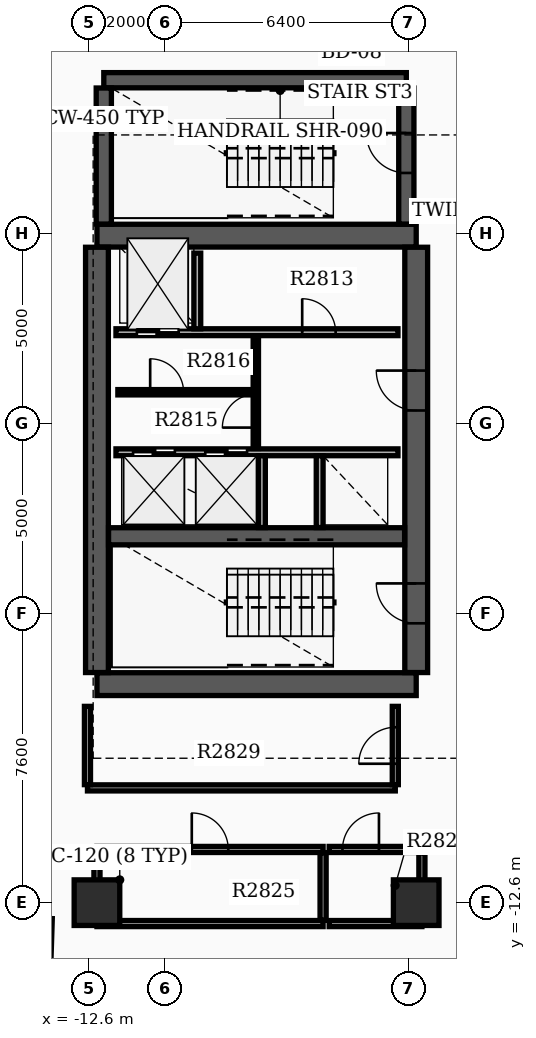
"""IFC4 building model, lengths in metres.
Left out: names, types, materials, properties, quantities, classifications, styles, units other than length and angle.
Written with IfcOpenShell. Run it as: python <this file> out.ifc"""

import sys

from ifc_helpers import new_model, si_unit, direction, frame, frame_2d, origin, origin_2d, place, context, subcontext, project, spatial, rectangle, extrude, element, fill, save


model = new_model("IFC4")
c1 = context("Model", 3, precision=1e-05, world=origin(), true_north=direction((0.0, 1.0)))
c2 = subcontext(c1, "Body", "Model", "MODEL_VIEW")
j1 = project(units=[si_unit("LENGTHUNIT", "METRE"), si_unit("PLANEANGLEUNIT", "RADIAN")], contexts=[c1])
p1 = place(None, origin())
s1 = spatial("IfcSite", under=j1, at=p1, CompositionType="ELEMENT")
p2 = place(p1, origin())
s2 = spatial("IfcBuilding", under=s1, at=p2, CompositionType="ELEMENT")
p3 = place(p2, frame((0.0, 0.0, 176.1)))
s3 = spatial("IfcBuildingStorey", under=s2, at=p3, CompositionType="ELEMENT", Elevation=176.1)
for number, where, z_axis, x_axis in (
    (1, (-12.4, -6.85, 0.0), (0.0, 0.0, 1.0), (1.0, 0.0, 0.0)),
    (2, (-12.4, 4.95, 0.0), (0.0, 0.0, 1.0), (1.0, 0.0, 0.0)),
):
    element("IfcWall", number, at=place(p3, frame(where, z_axis=z_axis, x_axis=x_axis)), inside=s3, PredefinedType="SHEAR", context=c2, shape_type="SweptSolid", body=[
        extrude(rectangle(XDim=8.4, YDim=0.6, at=frame_2d((4.2, 0.0))), origin(), (0.0, 0.0, 1.0), 3.7),
    ])
p4 = place(p3, frame((-12.4, -6.545, 0.0), z_axis=(0.0, 0.0, 1.0), x_axis=(0.0, 1.0, 0.0)))
e3 = element("IfcWall", 3, at=p4, inside=s3, PredefinedType="SHEAR", context=c2, shape_type="SweptSolid", body=[
    extrude(rectangle(XDim=11.19, YDim=0.6, at=frame_2d((5.595, 0.0))), origin(), (0.0, 0.0, 1.0), 3.7),
])
p5 = place(p3, frame((-4.0, -6.545, 0.0), z_axis=(0.0, 0.0, 1.0), x_axis=(0.0, 1.0, 0.0)))
e4 = element("IfcWall", 4, at=p5, inside=s3, PredefinedType="SHEAR", context=c2, shape_type="SweptSolid", body=[
    extrude(rectangle(XDim=11.19, YDim=0.6, at=frame_2d((5.595, 0.0))), origin(), (0.0, 0.0, 1.0), 3.7),
])
p6 = place(p5, frame((1.295, 0.0, 0.0)))
e5 = element("IfcOpeningElement", 5, at=p6, cuts=e4, PredefinedType="OPENING", context=c2, shape_type="SweptSolid", body=[
    extrude(rectangle(XDim=1.05, YDim=2.15, at=frame_2d((0.525, 1.075))), frame((0.0, 0.31, 0.0), z_axis=(0.0, -1.0, 0.0), x_axis=(1.0, 0.0, 0.0)), (0.0, 0.0, 1.0), 0.62),
])
p7 = place(p5, frame((6.895, 0.0, 0.0)))
e6 = element("IfcOpeningElement", 6, at=p7, cuts=e4, PredefinedType="OPENING", context=c2, shape_type="SweptSolid", body=[
    extrude(rectangle(XDim=1.05, YDim=2.15, at=frame_2d((0.525, 1.075))), frame((0.0, 0.31, 0.0), z_axis=(0.0, -1.0, 0.0), x_axis=(1.0, 0.0, 0.0)), (0.0, 0.0, 1.0), 0.62),
])
p8 = place(p3, frame((-12.095, -2.96, 0.0), z_axis=(0.0, 0.0, 1.0), x_axis=(1.0, 0.0, 0.0)))
e7 = element("IfcWall", 7, at=p8, inside=s3, PredefinedType="SHEAR", context=c2, shape_type="SweptSolid", body=[
    extrude(rectangle(XDim=7.79, YDim=0.45, at=frame_2d((3.895, 0.0))), origin(), (0.0, 0.0, 1.0), 3.7),
])
p9 = place(p3, frame((-12.22, 9.04, 0.0), z_axis=(0.0, 0.0, 1.0), x_axis=(1.0, 0.0, 0.0)))
e8 = element("IfcWall", 8, at=p9, inside=s3, PredefinedType="SHEAR", context=c2, shape_type="SweptSolid", body=[
    extrude(rectangle(XDim=7.96, YDim=0.4, at=frame_2d((3.98, 0.0))), origin(), (0.0, 0.0, 1.0), 3.7),
])
p10 = place(p3, frame((-12.22, 5.255, 0.0), z_axis=(0.0, 0.0, 1.0), x_axis=(0.0, 1.0, 0.0)))
e9 = element("IfcWall", 9, at=p10, inside=s3, PredefinedType="SHEAR", context=c2, shape_type="SweptSolid", body=[
    extrude(rectangle(XDim=3.58, YDim=0.4, at=frame_2d((1.79, 0.0))), origin(), (0.0, 0.0, 1.0), 3.7),
])
p11 = place(p3, frame((-4.26, 5.255, 0.0), z_axis=(0.0, 0.0, 1.0), x_axis=(0.0, 1.0, 0.0)))
e10 = element("IfcWall", 10, at=p11, inside=s3, PredefinedType="SHEAR", context=c2, shape_type="SweptSolid", body=[
    extrude(rectangle(XDim=3.58, YDim=0.4, at=frame_2d((1.79, 0.0))), origin(), (0.0, 0.0, 1.0), 3.7),
])
p12 = place(p11, frame((1.345, 0.0, 0.0)))
e11 = element("IfcOpeningElement", 11, at=p12, cuts=e10, PredefinedType="OPENING", context=c2, shape_type="SweptSolid", body=[
    extrude(rectangle(XDim=1.05, YDim=2.15, at=frame_2d((0.525, 1.075))), frame((0.0, 0.21, 0.0), z_axis=(0.0, -1.0, 0.0), x_axis=(1.0, 0.0, 0.0)), (0.0, 0.0, 1.0), 0.42),
])
for number, where, z_axis, x_axis in (
    (12, (-12.4, -12.6, 0.0), (0.0, 0.0, 1.0), (1.0, 0.0, 0.0)),
    (13, (-4.0, -12.6, 0.0), (0.0, 0.0, 1.0), (1.0, 0.0, 0.0)),
):
    element("IfcColumn", number, at=place(p3, frame(where, z_axis=z_axis, x_axis=x_axis)), inside=s3, PredefinedType="COLUMN", context=c2, shape_type="SweptSolid", body=[
        extrude(rectangle(XDim=1.2, YDim=1.2, at=origin_2d()), origin(), (0.0, 0.0, 1.0), 3.9),
    ])
p13 = place(p3, frame((-11.9, 2.41, 0.0), z_axis=(0.0, 0.0, 1.0), x_axis=(1.0, 0.0, 0.0)))
e14 = element("IfcWall", 14, at=p13, inside=s3, PredefinedType="SOLIDWALL", context=c2, shape_type="SweptSolid", body=[
    extrude(rectangle(XDim=7.42, YDim=0.18, at=frame_2d((3.71, 0.0))), origin(), (0.0, 0.0, 1.0), 2.96),
])
p14 = place(p13, frame((0.55, 0.0, 0.0)))
e15 = element("IfcOpeningElement", 15, at=p14, cuts=e14, PredefinedType="OPENING", context=c2, shape_type="SweptSolid", body=[
    extrude(rectangle(XDim=1.1, YDim=2.15, at=frame_2d((0.55, 1.075))), frame((0.0, 0.1, 0.0), z_axis=(0.0, -1.0, 0.0), x_axis=(1.0, 0.0, 0.0)), (0.0, 0.0, 1.0), 0.2),
])
p15 = place(p13, frame((4.9, 0.0, 0.0)))
e16 = element("IfcOpeningElement", 16, at=p15, cuts=e14, PredefinedType="OPENING", context=c2, shape_type="SweptSolid", body=[
    extrude(rectangle(XDim=0.88, YDim=2.1, at=frame_2d((0.44, 1.05))), frame((0.0, 0.1, 0.0), z_axis=(0.0, -1.0, 0.0), x_axis=(1.0, 0.0, 0.0)), (0.0, 0.0, 1.0), 0.2),
])
p16 = place(p3, frame((-11.9, -0.75, 0.0), z_axis=(0.0, 0.0, 1.0), x_axis=(1.0, 0.0, 0.0)))
e17 = element("IfcWall", 17, at=p16, inside=s3, PredefinedType="SOLIDWALL", context=c2, shape_type="SweptSolid", body=[
    extrude(rectangle(XDim=7.42, YDim=0.18, at=frame_2d((3.71, 0.0))), origin(), (0.0, 0.0, 1.0), 2.96),
])
p17 = place(p16, frame((0.45, 0.0, 0.0)))
e18 = element("IfcOpeningElement", 18, at=p17, cuts=e17, PredefinedType="OPENING", context=c2, shape_type="SweptSolid", body=[
    extrude(rectangle(XDim=1.1, YDim=2.15, at=frame_2d((0.55, 1.075))), frame((0.0, 0.1, 0.0), z_axis=(0.0, -1.0, 0.0), x_axis=(1.0, 0.0, 0.0)), (0.0, 0.0, 1.0), 0.2),
])
p18 = place(p16, frame((2.35, 0.0, 0.0)))
e19 = element("IfcOpeningElement", 19, at=p18, cuts=e17, PredefinedType="OPENING", context=c2, shape_type="SweptSolid", body=[
    extrude(rectangle(XDim=1.1, YDim=2.15, at=frame_2d((0.55, 1.075))), frame((0.0, 0.1, 0.0), z_axis=(0.0, -1.0, 0.0), x_axis=(1.0, 0.0, 0.0)), (0.0, 0.0, 1.0), 0.2),
])
p19 = place(p3, frame((-9.76, 2.5, 0.0), z_axis=(0.0, 0.0, 1.0), x_axis=(0.0, 1.0, 0.0)))
e20 = element("IfcWall", 20, at=p19, inside=s3, PredefinedType="SOLIDWALL", context=c2, shape_type="SweptSolid", body=[
    extrude(rectangle(XDim=1.99, YDim=0.18, at=frame_2d((0.995, 0.0))), origin(), (0.0, 0.0, 1.0), 2.96),
])
for number, where, z_axis, x_axis in (
    (21, (-8.06, -2.73, 0.0), (0.0, 0.0, 1.0), (0.0, 1.0, 0.0)),
    (22, (-6.54, -2.73, 0.0), (0.0, 0.0, 1.0), (0.0, 1.0, 0.0)),
):
    element("IfcWall", number, at=place(p3, frame(where, z_axis=z_axis, x_axis=x_axis)), inside=s3, PredefinedType="SOLIDWALL", context=c2, shape_type="SweptSolid", body=[
        extrude(rectangle(XDim=1.89, YDim=0.18, at=frame_2d((0.945, 0.0))), origin(), (0.0, 0.0, 1.0), 2.96),
    ])
p20 = place(p3, frame((-8.22, -0.65, 0.0), z_axis=(0.0, 0.0, 1.0), x_axis=(0.0, 1.0, 0.0)))
e23 = element("IfcWall", 23, at=p20, inside=s3, PredefinedType="SOLIDWALL", context=c2, shape_type="SweptSolid", body=[
    extrude(rectangle(XDim=2.96, YDim=0.14, at=frame_2d((1.48, 0.0))), origin(), (0.0, 0.0, 1.0), 2.96),
])
p21 = place(p20, frame((0.55, 0.0, 0.0)))
e24 = element("IfcOpeningElement", 24, at=p21, cuts=e23, PredefinedType="OPENING", context=c2, shape_type="SweptSolid", body=[
    extrude(rectangle(XDim=0.88, YDim=2.1, at=frame_2d((0.44, 1.05))), frame((0.0, 0.08, 0.0), z_axis=(0.0, -1.0, 0.0), x_axis=(1.0, 0.0, 0.0)), (0.0, 0.0, 1.0), 0.16),
])
p22 = place(p3, frame((-11.85, 0.83, 0.0), z_axis=(0.0, 0.0, 1.0), x_axis=(1.0, 0.0, 0.0)))
e25 = element("IfcWall", 25, at=p22, inside=s3, PredefinedType="PARTITIONING", context=c2, shape_type="SweptSolid", body=[
    extrude(rectangle(XDim=3.552, YDim=0.14, at=frame_2d((1.776, 0.0))), origin(), (0.0, 0.0, 1.0), 2.96),
])
p23 = place(p22, frame((0.85, 0.0, 0.0)))
e26 = element("IfcOpeningElement", 26, at=p23, cuts=e25, PredefinedType="OPENING", context=c2, shape_type="SweptSolid", body=[
    extrude(rectangle(XDim=0.88, YDim=2.1, at=frame_2d((0.44, 1.05))), frame((0.0, 0.08, 0.0), z_axis=(0.0, -1.0, 0.0), x_axis=(1.0, 0.0, 0.0)), (0.0, 0.0, 1.0), 0.16),
])
p24 = place(p3, frame((-12.4, -13.15, 0.0), z_axis=(0.0, 0.0, 1.0), x_axis=(1.0, 0.0, 0.0)))
e27 = element("IfcWall", 27, at=p24, inside=s3, PredefinedType="PARTITIONING", context=c2, shape_type="SweptSolid", body=[
    extrude(rectangle(XDim=5.95, YDim=0.16, at=frame_2d((2.975, 0.0))), origin(), (0.0, 0.0, 1.0), 2.96),
])
p25 = place(p3, frame((-12.4, -11.2, 0.0), z_axis=(0.0, 0.0, 1.0), x_axis=(1.0, 0.0, 0.0)))
e28 = element("IfcWall", 28, at=p25, inside=s3, PredefinedType="PARTITIONING", context=c2, shape_type="SweptSolid", body=[
    extrude(rectangle(XDim=5.95, YDim=0.16, at=frame_2d((2.975, 0.0))), origin(), (0.0, 0.0, 1.0), 2.96),
])
p26 = place(p25, frame((2.495, 0.0, 0.0)))
e29 = element("IfcOpeningElement", 29, at=p26, cuts=e28, PredefinedType="OPENING", context=c2, shape_type="SweptSolid", body=[
    extrude(rectangle(XDim=0.96, YDim=2.15, at=frame_2d((0.48, 1.075))), frame((0.0, 0.09, 0.0), z_axis=(0.0, -1.0, 0.0), x_axis=(1.0, 0.0, 0.0)), (0.0, 0.0, 1.0), 0.18),
])
for number, where, z_axis, x_axis in (
    (30, (-12.4, -13.065, 0.0), (0.0, 0.0, 1.0), (0.0, 1.0, 0.0)),
    (31, (-6.45, -13.065, 0.0), (0.0, 0.0, 1.0), (0.0, 1.0, 0.0)),
):
    element("IfcWall", number, at=place(p3, frame(where, z_axis=z_axis, x_axis=x_axis)), inside=s3, PredefinedType="PARTITIONING", context=c2, shape_type="SweptSolid", body=[
        extrude(rectangle(XDim=1.78, YDim=0.16, at=frame_2d((0.89, 0.0))), origin(), (0.0, 0.0, 1.0), 2.96),
    ])
p27 = place(p3, frame((-6.29, -13.15, 0.0), z_axis=(0.0, 0.0, 1.0), x_axis=(1.0, 0.0, 0.0)))
e32 = element("IfcWall", 32, at=p27, inside=s3, PredefinedType="PARTITIONING", context=c2, shape_type="SweptSolid", body=[
    extrude(rectangle(XDim=2.44, YDim=0.16, at=frame_2d((1.22, 0.0))), origin(), (0.0, 0.0, 1.0), 2.96),
])
p28 = place(p3, frame((-6.29, -11.2, 0.0), z_axis=(0.0, 0.0, 1.0), x_axis=(1.0, 0.0, 0.0)))
e33 = element("IfcWall", 33, at=p28, inside=s3, PredefinedType="PARTITIONING", context=c2, shape_type="SweptSolid", body=[
    extrude(rectangle(XDim=2.44, YDim=0.16, at=frame_2d((1.22, 0.0))), origin(), (0.0, 0.0, 1.0), 2.96),
])
p29 = place(p28, frame((0.35, 0.0, 0.0)))
e34 = element("IfcOpeningElement", 34, at=p29, cuts=e33, PredefinedType="OPENING", context=c2, shape_type="SweptSolid", body=[
    extrude(rectangle(XDim=0.96, YDim=2.15, at=frame_2d((0.48, 1.075))), frame((0.0, 0.09, 0.0), z_axis=(0.0, -1.0, 0.0), x_axis=(1.0, 0.0, 0.0)), (0.0, 0.0, 1.0), 0.18),
])
p30 = place(p3, frame((-3.85, -13.065, 0.0), z_axis=(0.0, 0.0, 1.0), x_axis=(0.0, 1.0, 0.0)))
e35 = element("IfcWall", 35, at=p30, inside=s3, PredefinedType="PARTITIONING", context=c2, shape_type="SweptSolid", body=[
    extrude(rectangle(XDim=1.78, YDim=0.16, at=frame_2d((0.89, 0.0))), origin(), (0.0, 0.0, 1.0), 2.96),
])
p31 = place(p3, frame((-12.65, -9.58, 0.0), z_axis=(0.0, 0.0, 1.0), x_axis=(1.0, 0.0, 0.0)))
e36 = element("IfcWall", 36, at=p31, inside=s3, PredefinedType="PARTITIONING", context=c2, shape_type="SweptSolid", body=[
    extrude(rectangle(XDim=8.1, YDim=0.16, at=frame_2d((4.05, 0.0))), origin(), (0.0, 0.0, 1.0), 2.96),
])
p32 = place(p3, frame((-12.65, -9.495, 0.0), z_axis=(0.0, 0.0, 1.0), x_axis=(0.0, 1.0, 0.0)))
e37 = element("IfcWall", 37, at=p32, inside=s3, PredefinedType="PARTITIONING", context=c2, shape_type="SweptSolid", body=[
    extrude(rectangle(XDim=2.06, YDim=0.16, at=frame_2d((1.03, 0.0))), origin(), (0.0, 0.0, 1.0), 2.96),
])
p33 = place(p3, frame((-4.55, -9.495, 0.0), z_axis=(0.0, 0.0, 1.0), x_axis=(0.0, 1.0, 0.0)))
e38 = element("IfcWall", 38, at=p33, inside=s3, PredefinedType="PARTITIONING", context=c2, shape_type="SweptSolid", body=[
    extrude(rectangle(XDim=2.06, YDim=0.16, at=frame_2d((1.03, 0.0))), origin(), (0.0, 0.0, 1.0), 2.96),
])
p34 = place(p33, frame((0.55, 0.0, 0.0)))
e39 = element("IfcOpeningElement", 39, at=p34, cuts=e38, PredefinedType="OPENING", context=c2, shape_type="SweptSolid", body=[
    extrude(rectangle(XDim=0.96, YDim=2.15, at=frame_2d((0.48, 1.075))), frame((0.0, 0.09, 0.0), z_axis=(0.0, -1.0, 0.0), x_axis=(1.0, 0.0, 0.0)), (0.0, 0.0, 1.0), 0.18),
])
p35 = place(p6, origin())
e40 = element("IfcDoor", 40, at=p35, inside=s3, OperationType="SINGLE_SWING_RIGHT", PredefinedType="DOOR", context=c2, shape_type="SweptSolid", body=[
    extrude(rectangle(XDim=1.05, YDim=2.15, at=frame_2d((0.525, 1.075))), frame((0.0, 0.025, 0.0), z_axis=(0.0, -1.0, 0.0), x_axis=(1.0, 0.0, 0.0)), (0.0, 0.0, 1.0), 0.05),
])
fill(e5, e40)
p36 = place(p7, origin())
e41 = element("IfcDoor", 41, at=p36, inside=s3, OperationType="SINGLE_SWING_RIGHT", PredefinedType="DOOR", context=c2, shape_type="SweptSolid", body=[
    extrude(rectangle(XDim=1.05, YDim=2.15, at=frame_2d((0.525, 1.075))), frame((0.0, 0.025, 0.0), z_axis=(0.0, -1.0, 0.0), x_axis=(1.0, 0.0, 0.0)), (0.0, 0.0, 1.0), 0.05),
])
fill(e6, e41)
p37 = place(p12, origin())
e42 = element("IfcDoor", 42, at=p37, inside=s3, OperationType="SINGLE_SWING_RIGHT", PredefinedType="DOOR", context=c2, shape_type="SweptSolid", body=[
    extrude(rectangle(XDim=1.05, YDim=2.15, at=frame_2d((0.525, 1.075))), frame((0.0, 0.025, 0.0), z_axis=(0.0, -1.0, 0.0), x_axis=(1.0, 0.0, 0.0)), (0.0, 0.0, 1.0), 0.05),
])
fill(e11, e42)
p38 = place(p14, origin())
e43 = element("IfcDoor", 43, at=p38, inside=s3, OperationType="DOUBLE_DOOR_SLIDING", PredefinedType="DOOR", context=c2, shape_type="SweptSolid", body=[
    extrude(rectangle(XDim=1.1, YDim=2.15, at=frame_2d((0.55, 1.075))), frame((0.0, 0.025, 0.0), z_axis=(0.0, -1.0, 0.0), x_axis=(1.0, 0.0, 0.0)), (0.0, 0.0, 1.0), 0.05),
])
fill(e15, e43)
p39 = place(p17, origin())
e44 = element("IfcDoor", 44, at=p39, inside=s3, OperationType="DOUBLE_DOOR_SLIDING", PredefinedType="DOOR", context=c2, shape_type="SweptSolid", body=[
    extrude(rectangle(XDim=1.1, YDim=2.15, at=frame_2d((0.55, 1.075))), frame((0.0, 0.025, 0.0), z_axis=(0.0, -1.0, 0.0), x_axis=(1.0, 0.0, 0.0)), (0.0, 0.0, 1.0), 0.05),
])
fill(e18, e44)
p40 = place(p18, origin())
e45 = element("IfcDoor", 45, at=p40, inside=s3, OperationType="DOUBLE_DOOR_SLIDING", PredefinedType="DOOR", context=c2, shape_type="SweptSolid", body=[
    extrude(rectangle(XDim=1.1, YDim=2.15, at=frame_2d((0.55, 1.075))), frame((0.0, 0.025, 0.0), z_axis=(0.0, -1.0, 0.0), x_axis=(1.0, 0.0, 0.0)), (0.0, 0.0, 1.0), 0.05),
])
fill(e19, e45)
p41 = place(p15, origin())
e46 = element("IfcDoor", 46, at=p41, inside=s3, OperationType="SINGLE_SWING_LEFT", PredefinedType="DOOR", context=c2, shape_type="SweptSolid", body=[
    extrude(rectangle(XDim=0.88, YDim=2.1, at=frame_2d((0.44, 1.05))), frame((0.0, 0.025, 0.0), z_axis=(0.0, -1.0, 0.0), x_axis=(1.0, 0.0, 0.0)), (0.0, 0.0, 1.0), 0.05),
])
fill(e16, e46)
p42 = place(p21, origin())
e47 = element("IfcDoor", 47, at=p42, inside=s3, OperationType="SINGLE_SWING_LEFT", PredefinedType="DOOR", context=c2, shape_type="SweptSolid", body=[
    extrude(rectangle(XDim=0.88, YDim=2.1, at=frame_2d((0.44, 1.05))), frame((0.0, 0.025, 0.0), z_axis=(0.0, -1.0, 0.0), x_axis=(1.0, 0.0, 0.0)), (0.0, 0.0, 1.0), 0.05),
])
fill(e24, e47)
p43 = place(p23, origin())
e48 = element("IfcDoor", 48, at=p43, inside=s3, OperationType="SINGLE_SWING_LEFT", PredefinedType="DOOR", context=c2, shape_type="SweptSolid", body=[
    extrude(rectangle(XDim=0.88, YDim=2.1, at=frame_2d((0.44, 1.05))), frame((0.0, 0.025, 0.0), z_axis=(0.0, -1.0, 0.0), x_axis=(1.0, 0.0, 0.0)), (0.0, 0.0, 1.0), 0.05),
])
fill(e26, e48)
p44 = place(p26, origin())
e49 = element("IfcDoor", 49, at=p44, inside=s3, OperationType="SINGLE_SWING_LEFT", PredefinedType="DOOR", context=c2, shape_type="SweptSolid", body=[
    extrude(rectangle(XDim=0.96, YDim=2.15, at=frame_2d((0.48, 1.075))), frame((0.0, 0.025, 0.0), z_axis=(0.0, -1.0, 0.0), x_axis=(1.0, 0.0, 0.0)), (0.0, 0.0, 1.0), 0.05),
])
fill(e29, e49)
p45 = place(p29, origin())
e50 = element("IfcDoor", 50, at=p45, inside=s3, OperationType="SINGLE_SWING_RIGHT", PredefinedType="DOOR", context=c2, shape_type="SweptSolid", body=[
    extrude(rectangle(XDim=0.96, YDim=2.15, at=frame_2d((0.48, 1.075))), frame((0.0, 0.025, 0.0), z_axis=(0.0, -1.0, 0.0), x_axis=(1.0, 0.0, 0.0)), (0.0, 0.0, 1.0), 0.05),
])
fill(e34, e50)
p46 = place(p34, origin())
e51 = element("IfcDoor", 51, at=p46, inside=s3, OperationType="SINGLE_SWING_LEFT", PredefinedType="DOOR", context=c2, shape_type="SweptSolid", body=[
    extrude(rectangle(XDim=0.96, YDim=2.15, at=frame_2d((0.48, 1.075))), frame((0.0, 0.025, 0.0), z_axis=(0.0, -1.0, 0.0), x_axis=(1.0, 0.0, 0.0)), (0.0, 0.0, 1.0), 0.05),
])
fill(e39, e51)
save(model, sys.argv[1])
